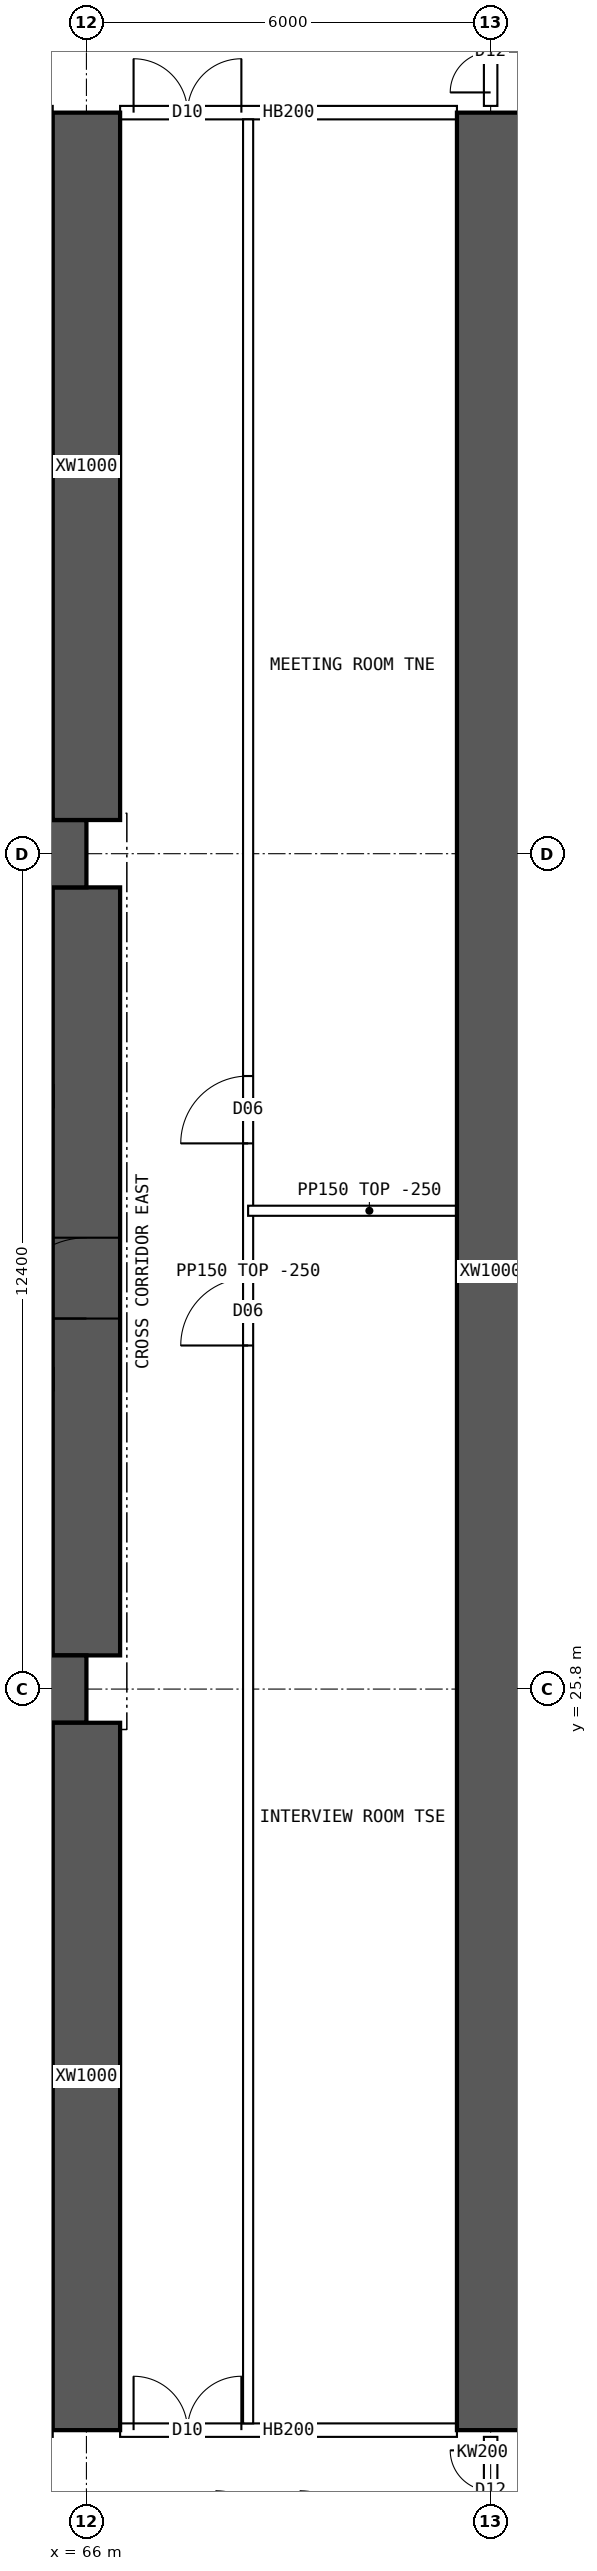
"""IFC4 building model, lengths in metres.
Left out: names, types, materials, properties, quantities, classifications, styles, units other than length and angle.
Written with IfcOpenShell. Run it as: python <this file> out.ifc"""

import sys

from ifc_helpers import new_model, si_unit, direction, frame, frame_2d, origin, place, context, subcontext, project, spatial, polyline, rectangle, outline, extrude, element, fill, save


model = new_model("IFC4")
c1 = context("Model", 3, precision=1e-05, world=origin(), true_north=direction((0.0, 1.0)))
c2 = subcontext(c1, "Body", "Model", "MODEL_VIEW")
j1 = project(units=[si_unit("LENGTHUNIT", "METRE"), si_unit("PLANEANGLEUNIT", "RADIAN")], contexts=[c1])
p1 = place(None, origin())
s1 = spatial("IfcSite", under=j1, at=p1, CompositionType="ELEMENT")
p2 = place(p1, origin())
s2 = spatial("IfcBuilding", under=s1, at=p2, CompositionType="ELEMENT")
p3 = place(p2, frame((0.0, 0.0, 23.95)))
s3 = spatial("IfcBuildingStorey", under=s2, at=p3, CompositionType="ELEMENT", Elevation=23.95)
for number, where, z_axis, x_axis in (
    (1, (18.0, 25.8, 0.0), (0.0, 0.0, 1.0), (1.0, 0.0, 0.0)),
    (2, (18.0, 38.2, 0.0), (0.0, 0.0, 1.0), (1.0, 0.0, 0.0)),
):
    element("IfcWall", number, at=place(p3, frame(where, z_axis=z_axis, x_axis=x_axis)), inside=s3, PredefinedType="SHEAR", context=c2, shape_type="SweptSolid", body=[
        extrude(rectangle(XDim=48.0, YDim=1.0, at=frame_2d((24.0, 0.0))), origin(), (0.0, 0.0, 1.0), 3.75),
    ])
p4 = place(p3, frame((66.0, 26.3, 0.0), z_axis=(0.0, 0.0, 1.0), x_axis=(0.0, 1.0, 0.0)))
e3 = element("IfcWall", 3, at=p4, inside=s3, PredefinedType="SHEAR", context=c2, shape_type="SweptSolid", body=[
    extrude(rectangle(XDim=11.4, YDim=1.0, at=frame_2d((5.7, 0.0))), origin(), (0.0, 0.0, 1.0), 3.75),
])
p5 = place(p4, frame((5.0, 0.0, 0.0)))
e4 = element("IfcOpeningElement", 4, at=p5, cuts=e3, PredefinedType="OPENING", context=c2, shape_type="SweptSolid", body=[
    extrude(rectangle(XDim=1.2, YDim=2.1, at=frame_2d((0.6, 1.05))), frame((0.0, 0.51, 0.0), z_axis=(0.0, -1.0, 0.0), x_axis=(1.0, 0.0, 0.0)), (0.0, 0.0, 1.0), 1.02),
])
for number, where, z_axis, x_axis in (
    (5, (66.0, 14.8, 0.0), (0.0, 0.0, 1.0), (0.0, 1.0, 0.0)),
    (6, (66.0, 38.7, 0.0), (0.0, 0.0, 1.0), (0.0, 1.0, 0.0)),
):
    element("IfcWall", number, at=place(p3, frame(where, z_axis=z_axis, x_axis=x_axis)), inside=s3, PredefinedType="SHEAR", context=c2, shape_type="SweptSolid", body=[
        extrude(rectangle(XDim=10.5, YDim=1.0, at=frame_2d((5.25, 0.0))), origin(), (0.0, 0.0, 1.0), 3.75),
    ])
p6 = place(p3, frame((72.0, 14.8, 0.0), z_axis=(0.0, 0.0, 1.0), x_axis=(0.0, 1.0, 0.0)))
e7 = element("IfcWall", 7, at=p6, inside=s3, PredefinedType="SHEAR", context=c2, shape_type="SweptSolid", body=[
    extrude(rectangle(XDim=34.4, YDim=1.0, at=frame_2d((17.2, 0.0))), origin(), (0.0, 0.0, 1.0), 3.75),
])
p7 = place(p3, frame((66.5, 14.8, 0.0), z_axis=(0.0, 0.0, 1.0), x_axis=(1.0, 0.0, 0.0)))
e8 = element("IfcWall", 8, at=p7, inside=s3, PredefinedType="SOLIDWALL", context=c2, shape_type="SweptSolid", body=[
    extrude(rectangle(XDim=5.0, YDim=0.2, at=frame_2d((2.5, 0.0))), origin(), (0.0, 0.0, 1.0), 3.5),
])
p8 = place(p7, frame((0.2, 0.0, 0.0)))
e9 = element("IfcOpeningElement", 9, at=p8, cuts=e8, PredefinedType="OPENING", context=c2, shape_type="SweptSolid", body=[
    extrude(rectangle(XDim=1.6, YDim=2.1, at=frame_2d((0.8, 1.05))), frame((0.0, 0.11, 0.0), z_axis=(0.0, -1.0, 0.0), x_axis=(1.0, 0.0, 0.0)), (0.0, 0.0, 1.0), 0.22),
])
p9 = place(p3, frame((66.5, 49.2, 0.0), z_axis=(0.0, 0.0, 1.0), x_axis=(1.0, 0.0, 0.0)))
e10 = element("IfcWall", 10, at=p9, inside=s3, PredefinedType="SOLIDWALL", context=c2, shape_type="SweptSolid", body=[
    extrude(rectangle(XDim=5.0, YDim=0.2, at=frame_2d((2.5, 0.0))), origin(), (0.0, 0.0, 1.0), 3.5),
])
p10 = place(p9, frame((0.2, 0.0, 0.0)))
e11 = element("IfcOpeningElement", 11, at=p10, cuts=e10, PredefinedType="OPENING", context=c2, shape_type="SweptSolid", body=[
    extrude(rectangle(XDim=1.6, YDim=2.1, at=frame_2d((0.8, 1.05))), frame((0.0, 0.11, 0.0), z_axis=(0.0, -1.0, 0.0), x_axis=(1.0, 0.0, 0.0)), (0.0, 0.0, 1.0), 0.22),
])
p11 = place(p3, frame((68.4, 14.9, 0.0), z_axis=(0.0, 0.0, 1.0), x_axis=(0.0, 1.0, 0.0)))
e12 = element("IfcWall", 12, at=p11, inside=s3, PredefinedType="PARTITIONING", context=c2, shape_type="SweptSolid", body=[
    extrude(rectangle(XDim=34.2, YDim=0.15, at=frame_2d((17.1, 0.0))), origin(), (0.0, 0.0, 1.0), 3.5),
])
p12 = place(p11, frame((16.0, 0.0, 0.0)))
e13 = element("IfcOpeningElement", 13, at=p12, cuts=e12, PredefinedType="OPENING", context=c2, shape_type="SweptSolid", body=[
    extrude(rectangle(XDim=1.0, YDim=2.1, at=frame_2d((0.5, 1.05))), frame((0.0, 0.085, 0.0), z_axis=(0.0, -1.0, 0.0), x_axis=(1.0, 0.0, 0.0)), (0.0, 0.0, 1.0), 0.17),
])
p13 = place(p11, frame((19.0, 0.0, 0.0)))
e14 = element("IfcOpeningElement", 14, at=p13, cuts=e12, PredefinedType="OPENING", context=c2, shape_type="SweptSolid", body=[
    extrude(rectangle(XDim=1.0, YDim=2.1, at=frame_2d((0.5, 1.05))), frame((0.0, 0.085, 0.0), z_axis=(0.0, -1.0, 0.0), x_axis=(1.0, 0.0, 0.0)), (0.0, 0.0, 1.0), 0.17),
])
p14 = place(p3, frame((68.4, 32.9, 0.0), z_axis=(0.0, 0.0, 1.0), x_axis=(1.0, 0.0, 0.0)))
e15 = element("IfcWall", 15, at=p14, inside=s3, PredefinedType="PARTITIONING", context=c2, shape_type="SweptSolid", body=[
    extrude(rectangle(XDim=3.6, YDim=0.15, at=frame_2d((1.8, 0.0))), origin(), (0.0, 0.0, 1.0), 3.5),
])
p15 = place(p3, frame((72.075, 30.85, 0.0), z_axis=(0.0, 0.0, 1.0), x_axis=(1.0, 0.0, 0.0)))
e16 = element("IfcWall", 16, at=p15, inside=s3, PredefinedType="PARTITIONING", context=c2, shape_type="SweptSolid", body=[
    extrude(outline(polyline([(0.0, 0.0), (8.02, 0.0), (8.02, 3.5), (6.227, 3.5), (6.225, 3.05), (5.627, 3.05), (5.625, 3.5), (0.0, 3.5), (0.0, 0.0)])), frame((0.0, 0.075, 0.0), z_axis=(0.0, -1.0, 0.0), x_axis=(1.0, 0.0, 0.0)), (0.0, 0.0, 1.0), 0.15),
])
p16 = place(p3, frame((72.0, 13.1, 0.0), z_axis=(0.0, 0.0, 1.0), x_axis=(0.0, 1.0, 0.0)))
e17 = element("IfcWall", 17, at=p16, inside=s3, PredefinedType="SOLIDWALL", context=c2, shape_type="SweptSolid", body=[
    extrude(outline(polyline([(0.0, 0.0), (1.6, 0.0), (1.6, 3.05), (0.0, 3.05), (0.0, 0.0)])), frame((0.0, 0.1, 0.0), z_axis=(0.0, -1.0, 0.0), x_axis=(1.0, 0.0, 0.0)), (0.0, 0.0, 1.0), 0.2),
])
p17 = place(p16, frame((0.2, 0.0, 0.0)))
e18 = element("IfcOpeningElement", 18, at=p17, cuts=e17, PredefinedType="OPENING", context=c2, shape_type="SweptSolid", body=[
    extrude(rectangle(XDim=1.2, YDim=2.1, at=frame_2d((0.6, 1.05))), frame((0.0, 0.11, 0.0), z_axis=(0.0, -1.0, 0.0), x_axis=(1.0, 0.0, 0.0)), (0.0, 0.0, 1.0), 0.22),
])
p18 = place(p3, frame((72.0, 49.3, 0.0), z_axis=(0.0, 0.0, 1.0), x_axis=(0.0, 1.0, 0.0)))
e19 = element("IfcWall", 19, at=p18, inside=s3, PredefinedType="SOLIDWALL", context=c2, shape_type="SweptSolid", body=[
    extrude(outline(polyline([(0.0, 0.0), (1.6, 0.0), (1.6, 3.05), (0.0, 3.05), (0.0, 0.0)])), frame((0.0, 0.1, 0.0), z_axis=(0.0, -1.0, 0.0), x_axis=(1.0, 0.0, 0.0)), (0.0, 0.0, 1.0), 0.2),
])
p19 = place(p18, frame((0.2, 0.0, 0.0)))
e20 = element("IfcOpeningElement", 20, at=p19, cuts=e19, PredefinedType="OPENING", context=c2, shape_type="SweptSolid", body=[
    extrude(rectangle(XDim=1.2, YDim=2.1, at=frame_2d((0.6, 1.05))), frame((0.0, 0.11, 0.0), z_axis=(0.0, -1.0, 0.0), x_axis=(1.0, 0.0, 0.0)), (0.0, 0.0, 1.0), 0.22),
])
p20 = place(p5, origin())
e21 = element("IfcDoor", 21, at=p20, inside=s3, OperationType="SINGLE_SWING_LEFT", PredefinedType="DOOR", context=c2, shape_type="SweptSolid", body=[
    extrude(rectangle(XDim=1.2, YDim=2.1, at=frame_2d((0.6, 1.05))), frame((0.0, 0.025, 0.0), z_axis=(0.0, -1.0, 0.0), x_axis=(1.0, 0.0, 0.0)), (0.0, 0.0, 1.0), 0.05),
])
fill(e4, e21)
p21 = place(p8, origin())
e22 = element("IfcDoor", 22, at=p21, inside=s3, OperationType="DOUBLE_DOOR_SINGLE_SWING", PredefinedType="DOOR", context=c2, shape_type="SweptSolid", body=[
    extrude(rectangle(XDim=1.6, YDim=2.1, at=frame_2d((0.8, 1.05))), frame((0.0, 0.025, 0.0), z_axis=(0.0, -1.0, 0.0), x_axis=(1.0, 0.0, 0.0)), (0.0, 0.0, 1.0), 0.05),
])
fill(e9, e22)
p22 = place(p10, origin())
e23 = element("IfcDoor", 23, at=p22, inside=s3, OperationType="DOUBLE_DOOR_SINGLE_SWING", PredefinedType="DOOR", context=c2, shape_type="SweptSolid", body=[
    extrude(rectangle(XDim=1.6, YDim=2.1, at=frame_2d((0.8, 1.05))), frame((0.0, 0.025, 0.0), z_axis=(0.0, -1.0, 0.0), x_axis=(1.0, 0.0, 0.0)), (0.0, 0.0, 1.0), 0.05),
])
fill(e11, e23)
p23 = place(p12, origin())
e24 = element("IfcDoor", 24, at=p23, inside=s3, OperationType="SINGLE_SWING_LEFT", PredefinedType="DOOR", context=c2, shape_type="SweptSolid", body=[
    extrude(rectangle(XDim=1.0, YDim=2.1, at=frame_2d((0.5, 1.05))), frame((0.0, 0.025, 0.0), z_axis=(0.0, -1.0, 0.0), x_axis=(1.0, 0.0, 0.0)), (0.0, 0.0, 1.0), 0.05),
])
fill(e13, e24)
p24 = place(p13, origin())
e25 = element("IfcDoor", 25, at=p24, inside=s3, OperationType="SINGLE_SWING_LEFT", PredefinedType="DOOR", context=c2, shape_type="SweptSolid", body=[
    extrude(rectangle(XDim=1.0, YDim=2.1, at=frame_2d((0.5, 1.05))), frame((0.0, 0.025, 0.0), z_axis=(0.0, -1.0, 0.0), x_axis=(1.0, 0.0, 0.0)), (0.0, 0.0, 1.0), 0.05),
])
fill(e14, e25)
p25 = place(p17, origin())
e26 = element("IfcDoor", 26, at=p25, inside=s3, OperationType="DOUBLE_DOOR_SINGLE_SWING", PredefinedType="DOOR", context=c2, shape_type="SweptSolid", body=[
    extrude(rectangle(XDim=1.2, YDim=2.1, at=frame_2d((0.6, 1.05))), frame((0.0, 0.025, 0.0), z_axis=(0.0, -1.0, 0.0), x_axis=(1.0, 0.0, 0.0)), (0.0, 0.0, 1.0), 0.05),
])
fill(e18, e26)
p26 = place(p19, origin())
e27 = element("IfcDoor", 27, at=p26, inside=s3, OperationType="DOUBLE_DOOR_SINGLE_SWING", PredefinedType="DOOR", context=c2, shape_type="SweptSolid", body=[
    extrude(rectangle(XDim=1.2, YDim=2.1, at=frame_2d((0.6, 1.05))), frame((0.0, 0.025, 0.0), z_axis=(0.0, -1.0, 0.0), x_axis=(1.0, 0.0, 0.0)), (0.0, 0.0, 1.0), 0.05),
])
fill(e20, e27)
save(model, sys.argv[1])
